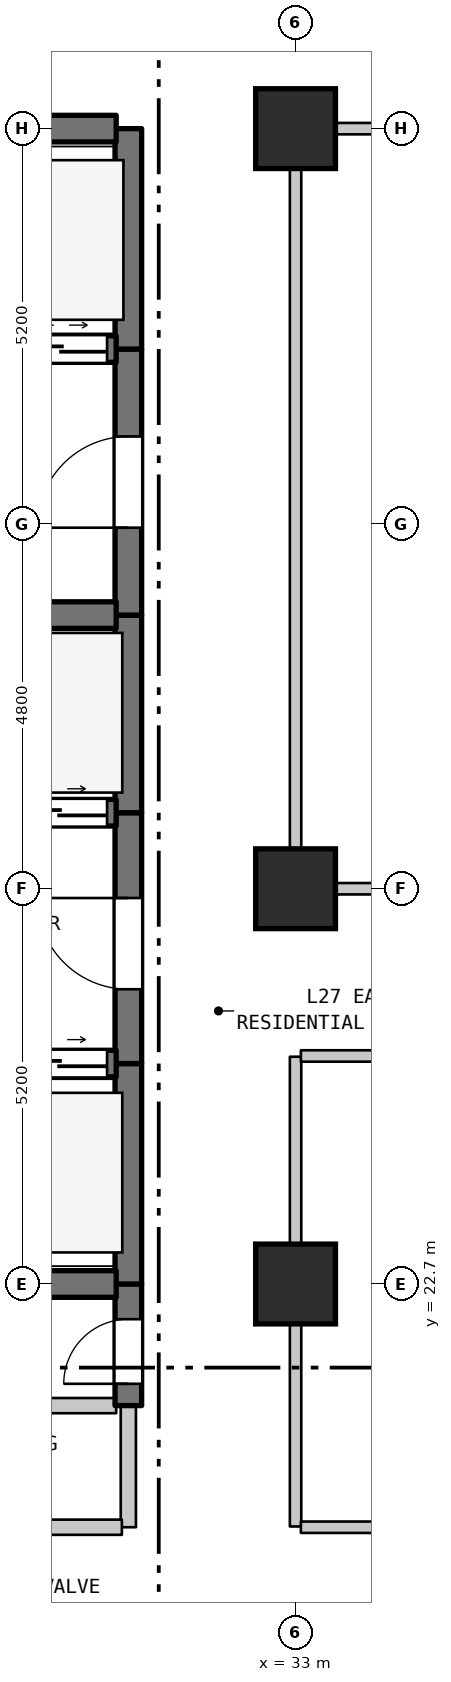
"""IFC4 building model, lengths in metres.
Left out: names, types, materials, properties, quantities, classifications, styles, units other than length and angle.
Written with IfcOpenShell. Run it as: python <this file> out.ifc"""

import sys

from ifc_helpers import new_model, si_unit, direction, frame, frame_2d, origin, origin_2d, place, context, subcontext, project, spatial, rectangle, extrude, element, fill, save


model = new_model("IFC4")
c1 = context("Model", 3, precision=1e-05, world=origin(), true_north=direction((0.0, 1.0)))
c2 = subcontext(c1, "Body", "Model", "MODEL_VIEW")
j1 = project(units=[si_unit("LENGTHUNIT", "METRE"), si_unit("PLANEANGLEUNIT", "RADIAN")], contexts=[c1])
p1 = place(None, origin())
s1 = spatial("IfcSite", under=j1, at=p1, CompositionType="ELEMENT")
p2 = place(p1, origin())
s2 = spatial("IfcBuilding", under=s1, at=p2, CompositionType="ELEMENT")
p3 = place(p2, frame((0.0, 0.0, 113.1)))
s3 = spatial("IfcBuildingStorey", under=s2, at=p3, CompositionType="ELEMENT", Elevation=113.1)
for number, where, z_axis, x_axis in (
    (1, (33.0, 22.7, 0.0), (0.0, 0.0, 1.0), (1.0, 0.0, 0.0)),
    (2, (33.0, 27.9, 0.0), (0.0, 0.0, 1.0), (1.0, 0.0, 0.0)),
    (3, (33.0, 37.9, 0.0), (0.0, 0.0, 1.0), (1.0, 0.0, 0.0)),
):
    element("IfcColumn", number, at=place(p3, frame(where, z_axis=z_axis, x_axis=x_axis)), inside=s3, PredefinedType="COLUMN", context=c2, shape_type="SweptSolid", body=[
        extrude(rectangle(XDim=1.05, YDim=1.05, at=origin_2d()), origin(), (0.0, 0.0, 1.0), 3.7),
    ])
p4 = place(p3, frame((30.8, 19.5, 0.0), z_axis=(0.0, 0.0, 1.0), x_axis=(0.0, 1.0, 0.0)))
e4 = element("IfcWall", 4, at=p4, inside=s3, PredefinedType="STANDARD", context=c2, shape_type="SweptSolid", body=[
    extrude(rectangle(XDim=1.6, YDim=0.2, at=frame_2d((0.8, 0.0))), origin(), (0.0, 0.0, 1.0), 3.385),
])
p5 = place(p3, frame((30.8, 21.1, 0.0), z_axis=(0.0, 0.0, 1.0), x_axis=(0.0, 1.0, 0.0)))
e5 = element("IfcWall", 5, at=p5, inside=s3, PredefinedType="SHEAR", context=c2, shape_type="SweptSolid", body=[
    extrude(rectangle(XDim=1.6, YDim=0.35, at=frame_2d((0.8, 0.0))), origin(), (0.0, 0.0, 1.0), 3.385),
])
p6 = place(p5, frame((0.287, 0.0, 0.0)))
e6 = element("IfcOpeningElement", 6, at=p6, cuts=e5, PredefinedType="OPENING", context=c2, shape_type="SweptSolid", body=[
    extrude(rectangle(XDim=0.85, YDim=2.1, at=frame_2d((0.425, 1.05))), frame((0.0, 0.185, 0.0), z_axis=(0.0, -1.0, 0.0), x_axis=(1.0, 0.0, 0.0)), (0.0, 0.0, 1.0), 0.37),
])
p7 = place(p3, frame((30.8, 22.7, 0.0), z_axis=(0.0, 0.0, 1.0), x_axis=(0.0, 1.0, 0.0)))
e7 = element("IfcWall", 7, at=p7, inside=s3, PredefinedType="SHEAR", context=c2, shape_type="SweptSolid", body=[
    extrude(rectangle(XDim=2.9, YDim=0.35, at=frame_2d((1.45, 0.0))), origin(), (0.0, 0.0, 1.0), 3.385),
])
p8 = place(p3, frame((30.8, 25.6, 0.0), z_axis=(0.0, 0.0, 1.0), x_axis=(0.0, 1.0, 0.0)))
e8 = element("IfcWall", 8, at=p8, inside=s3, PredefinedType="SHEAR", context=c2, shape_type="SweptSolid", body=[
    extrude(rectangle(XDim=3.3, YDim=0.35, at=frame_2d((1.65, 0.0))), origin(), (0.0, 0.0, 1.0), 3.385),
])
p9 = place(p8, frame((0.978, 0.0, 0.0)))
e9 = element("IfcOpeningElement", 9, at=p9, cuts=e8, PredefinedType="OPENING", context=c2, shape_type="SweptSolid", body=[
    extrude(rectangle(XDim=1.2, YDim=2.2, at=frame_2d((0.6, 1.1))), frame((0.0, 0.185, 0.0), z_axis=(0.0, -1.0, 0.0), x_axis=(1.0, 0.0, 0.0)), (0.0, 0.0, 1.0), 0.37),
])
p10 = place(p3, frame((30.8, 28.9, 0.0), z_axis=(0.0, 0.0, 1.0), x_axis=(0.0, 1.0, 0.0)))
e10 = element("IfcWall", 10, at=p10, inside=s3, PredefinedType="SHEAR", context=c2, shape_type="SweptSolid", body=[
    extrude(rectangle(XDim=2.6, YDim=0.35, at=frame_2d((1.3, 0.0))), origin(), (0.0, 0.0, 1.0), 3.385),
])
p11 = place(p3, frame((30.8, 31.5, 0.0), z_axis=(0.0, 0.0, 1.0), x_axis=(0.0, 1.0, 0.0)))
e11 = element("IfcWall", 11, at=p11, inside=s3, PredefinedType="SHEAR", context=c2, shape_type="SweptSolid", body=[
    extrude(rectangle(XDim=3.5, YDim=0.35, at=frame_2d((1.75, 0.0))), origin(), (0.0, 0.0, 1.0), 3.385),
])
p12 = place(p11, frame((1.15, 0.0, 0.0)))
e12 = element("IfcOpeningElement", 12, at=p12, cuts=e11, PredefinedType="OPENING", context=c2, shape_type="SweptSolid", body=[
    extrude(rectangle(XDim=1.2, YDim=2.2, at=frame_2d((0.6, 1.1))), frame((0.0, 0.185, 0.0), z_axis=(0.0, -1.0, 0.0), x_axis=(1.0, 0.0, 0.0)), (0.0, 0.0, 1.0), 0.37),
])
p13 = place(p3, frame((30.8, 35.0, 0.0), z_axis=(0.0, 0.0, 1.0), x_axis=(0.0, 1.0, 0.0)))
e13 = element("IfcWall", 13, at=p13, inside=s3, PredefinedType="SHEAR", context=c2, shape_type="SweptSolid", body=[
    extrude(rectangle(XDim=2.9, YDim=0.35, at=frame_2d((1.45, 0.0))), origin(), (0.0, 0.0, 1.0), 3.385),
])
p14 = place(p3, frame((33.0, 19.51, 0.0), z_axis=(0.0, 0.0, 1.0), x_axis=(0.0, 1.0, 0.0)))
e14 = element("IfcWall", 14, at=p14, inside=s3, PredefinedType="STANDARD", context=c2, shape_type="SweptSolid", body=[
    extrude(rectangle(XDim=6.18, YDim=0.15, at=frame_2d((3.09, 0.0))), origin(), (0.0, 0.0, 1.0), 2.935),
])
p15 = place(p3, frame((33.0, 27.91, 0.0), z_axis=(0.0, 0.0, 1.0), x_axis=(0.0, 1.0, 0.0)))
e15 = element("IfcWall", 15, at=p15, inside=s3, PredefinedType="STANDARD", context=c2, shape_type="SweptSolid", body=[
    extrude(rectangle(XDim=9.98, YDim=0.15, at=frame_2d((4.99, 0.0))), origin(), (0.0, 0.0, 1.0), 2.885),
])
p16 = place(p3, frame((27.285, 19.5, 0.0), z_axis=(0.0, 0.0, 1.0), x_axis=(1.0, 0.0, 0.0)))
e16 = element("IfcWall", 16, at=p16, inside=s3, PredefinedType="STANDARD", context=c2, shape_type="SweptSolid", body=[
    extrude(rectangle(XDim=3.43, YDim=0.2, at=frame_2d((1.715, 0.0))), origin(), (0.0, 0.0, 1.0), 3.385),
])
p17 = place(p16, frame((1.192, 0.0, 0.0)))
e17 = element("IfcOpeningElement", 17, at=p17, cuts=e16, PredefinedType="OPENING", context=c2, shape_type="SweptSolid", body=[
    extrude(rectangle(XDim=0.9, YDim=2.15, at=frame_2d((0.45, 1.075))), frame((0.0, 0.11, 0.0), z_axis=(0.0, -1.0, 0.0), x_axis=(1.0, 0.0, 0.0)), (0.0, 0.0, 1.0), 0.22),
])
p18 = place(p3, frame((33.07, 19.5, 0.0), z_axis=(0.0, 0.0, 1.0), x_axis=(1.0, 0.0, 0.0)))
e18 = element("IfcWall", 18, at=p18, inside=s3, PredefinedType="STANDARD", context=c2, shape_type="SweptSolid", body=[
    extrude(rectangle(XDim=21.51, YDim=0.15, at=frame_2d((10.755, 0.0))), origin(), (0.0, 0.0, 1.0), 3.385),
])
p19 = place(p3, frame((27.285, 21.1, 0.0), z_axis=(0.0, 0.0, 1.0), x_axis=(1.0, 0.0, 0.0)))
e19 = element("IfcWall", 19, at=p19, inside=s3, PredefinedType="STANDARD", context=c2, shape_type="SweptSolid", body=[
    extrude(rectangle(XDim=3.355, YDim=0.2, at=frame_2d((1.677, 0.0))), origin(), (0.0, 0.0, 1.0), 3.385),
])
p20 = place(p3, frame((27.46, 22.7, 0.0), z_axis=(0.0, 0.0, 1.0), x_axis=(1.0, 0.0, 0.0)))
e20 = element("IfcWall", 20, at=p20, inside=s3, PredefinedType="SHEAR", context=c2, shape_type="SweptSolid", body=[
    extrude(rectangle(XDim=3.18, YDim=0.35, at=frame_2d((1.59, 0.0))), origin(), (0.0, 0.0, 1.0), 3.385),
])
p21 = place(p3, frame((27.46, 25.6, 0.0), z_axis=(0.0, 0.0, 1.0), x_axis=(1.0, 0.0, 0.0)))
e21 = element("IfcWall", 21, at=p21, inside=s3, PredefinedType="SHEAR", context=c2, shape_type="SweptSolid", body=[
    extrude(rectangle(XDim=3.18, YDim=0.35, at=frame_2d((1.59, 0.0))), origin(), (0.0, 0.0, 1.0), 3.385),
])
p22 = place(p21, frame((0.12, 0.0, 0.0)))
e22 = element("IfcOpeningElement", 22, at=p22, cuts=e21, PredefinedType="OPENING", context=c2, shape_type="SweptSolid", body=[
    extrude(rectangle(XDim=1.25, YDim=2.2, at=frame_2d((0.625, 1.1))), frame((0.0, 0.185, 0.0), z_axis=(0.0, -1.0, 0.0), x_axis=(1.0, 0.0, 0.0)), (0.0, 0.0, 1.0), 0.37),
])
p23 = place(p21, frame((1.81, 0.0, 0.0)))
e23 = element("IfcOpeningElement", 23, at=p23, cuts=e21, PredefinedType="OPENING", context=c2, shape_type="SweptSolid", body=[
    extrude(rectangle(XDim=1.25, YDim=2.2, at=frame_2d((0.625, 1.1))), frame((0.0, 0.185, 0.0), z_axis=(0.0, -1.0, 0.0), x_axis=(1.0, 0.0, 0.0)), (0.0, 0.0, 1.0), 0.37),
])
p24 = place(p3, frame((33.07, 25.7, 0.0), z_axis=(0.0, 0.0, 1.0), x_axis=(1.0, 0.0, 0.0)))
e24 = element("IfcWall", 24, at=p24, inside=s3, PredefinedType="STANDARD", context=c2, shape_type="SweptSolid", body=[
    extrude(rectangle(XDim=21.51, YDim=0.15, at=frame_2d((10.755, 0.0))), origin(), (0.0, 0.0, 1.0), 3.385),
])
p25 = place(p3, frame((33.07, 27.9, 0.0), z_axis=(0.0, 0.0, 1.0), x_axis=(1.0, 0.0, 0.0)))
e25 = element("IfcWall", 25, at=p25, inside=s3, PredefinedType="STANDARD", context=c2, shape_type="SweptSolid", body=[
    extrude(rectangle(XDim=11.93, YDim=0.15, at=frame_2d((5.965, 0.0))), origin(), (0.0, 0.0, 1.0), 2.885),
])
p26 = place(p25, frame((10.185, 0.0, 0.0)))
e26 = element("IfcOpeningElement", 26, at=p26, cuts=e25, PredefinedType="OPENING", context=c2, shape_type="SweptSolid", body=[
    extrude(rectangle(XDim=1.0, YDim=2.15, at=frame_2d((0.5, 1.075))), frame((0.0, 0.085, 0.0), z_axis=(0.0, -1.0, 0.0), x_axis=(1.0, 0.0, 0.0)), (0.0, 0.0, 1.0), 0.17),
])
p27 = place(p3, frame((27.46, 28.9, 0.0), z_axis=(0.0, 0.0, 1.0), x_axis=(1.0, 0.0, 0.0)))
e27 = element("IfcWall", 27, at=p27, inside=s3, PredefinedType="SHEAR", context=c2, shape_type="SweptSolid", body=[
    extrude(rectangle(XDim=3.18, YDim=0.35, at=frame_2d((1.59, 0.0))), origin(), (0.0, 0.0, 1.0), 3.385),
])
p28 = place(p27, frame((0.12, 0.0, 0.0)))
e28 = element("IfcOpeningElement", 28, at=p28, cuts=e27, PredefinedType="OPENING", context=c2, shape_type="SweptSolid", body=[
    extrude(rectangle(XDim=1.25, YDim=2.2, at=frame_2d((0.625, 1.1))), frame((0.0, 0.185, 0.0), z_axis=(0.0, -1.0, 0.0), x_axis=(1.0, 0.0, 0.0)), (0.0, 0.0, 1.0), 0.37),
])
p29 = place(p27, frame((1.81, 0.0, 0.0)))
e29 = element("IfcOpeningElement", 29, at=p29, cuts=e27, PredefinedType="OPENING", context=c2, shape_type="SweptSolid", body=[
    extrude(rectangle(XDim=1.25, YDim=2.2, at=frame_2d((0.625, 1.1))), frame((0.0, 0.185, 0.0), z_axis=(0.0, -1.0, 0.0), x_axis=(1.0, 0.0, 0.0)), (0.0, 0.0, 1.0), 0.37),
])
p30 = place(p3, frame((27.46, 31.5, 0.0), z_axis=(0.0, 0.0, 1.0), x_axis=(1.0, 0.0, 0.0)))
e30 = element("IfcWall", 30, at=p30, inside=s3, PredefinedType="SHEAR", context=c2, shape_type="SweptSolid", body=[
    extrude(rectangle(XDim=3.18, YDim=0.35, at=frame_2d((1.59, 0.0))), origin(), (0.0, 0.0, 1.0), 3.385),
])
p31 = place(p3, frame((19.16, 35.0, 0.0), z_axis=(0.0, 0.0, 1.0), x_axis=(1.0, 0.0, 0.0)))
e31 = element("IfcWall", 31, at=p31, inside=s3, PredefinedType="SHEAR", context=c2, shape_type="SweptSolid", body=[
    extrude(rectangle(XDim=11.48, YDim=0.35, at=frame_2d((5.74, 0.0))), origin(), (0.0, 0.0, 1.0), 3.385),
])
p32 = place(p31, frame((0.365, 0.0, 0.0)))
e32 = element("IfcOpeningElement", 32, at=p32, cuts=e31, PredefinedType="OPENING", context=c2, shape_type="SweptSolid", body=[
    extrude(rectangle(XDim=1.35, YDim=2.2, at=frame_2d((0.675, 1.1))), frame((0.0, 0.185, 0.0), z_axis=(0.0, -1.0, 0.0), x_axis=(1.0, 0.0, 0.0)), (0.0, 0.0, 1.0), 0.37),
])
p33 = place(p31, frame((2.765, 0.0, 0.0)))
e33 = element("IfcOpeningElement", 33, at=p33, cuts=e31, PredefinedType="OPENING", context=c2, shape_type="SweptSolid", body=[
    extrude(rectangle(XDim=1.35, YDim=2.2, at=frame_2d((0.675, 1.1))), frame((0.0, 0.185, 0.0), z_axis=(0.0, -1.0, 0.0), x_axis=(1.0, 0.0, 0.0)), (0.0, 0.0, 1.0), 0.37),
])
p34 = place(p31, frame((4.915, 0.0, 0.0)))
e34 = element("IfcOpeningElement", 34, at=p34, cuts=e31, PredefinedType="OPENING", context=c2, shape_type="SweptSolid", body=[
    extrude(rectangle(XDim=1.2, YDim=2.2, at=frame_2d((0.6, 1.1))), frame((0.0, 0.185, 0.0), z_axis=(0.0, -1.0, 0.0), x_axis=(1.0, 0.0, 0.0)), (0.0, 0.0, 1.0), 0.37),
])
p35 = place(p31, frame((6.665, 0.0, 0.0)))
e35 = element("IfcOpeningElement", 35, at=p35, cuts=e31, PredefinedType="OPENING", context=c2, shape_type="SweptSolid", body=[
    extrude(rectangle(XDim=1.2, YDim=2.2, at=frame_2d((0.6, 1.1))), frame((0.0, 0.185, 0.0), z_axis=(0.0, -1.0, 0.0), x_axis=(1.0, 0.0, 0.0)), (0.0, 0.0, 1.0), 0.37),
])
p36 = place(p31, frame((8.415, 0.0, 0.0)))
e36 = element("IfcOpeningElement", 36, at=p36, cuts=e31, PredefinedType="OPENING", context=c2, shape_type="SweptSolid", body=[
    extrude(rectangle(XDim=1.2, YDim=2.2, at=frame_2d((0.6, 1.1))), frame((0.0, 0.185, 0.0), z_axis=(0.0, -1.0, 0.0), x_axis=(1.0, 0.0, 0.0)), (0.0, 0.0, 1.0), 0.37),
])
p37 = place(p31, frame((10.16, 0.0, 0.0)))
e37 = element("IfcOpeningElement", 37, at=p37, cuts=e31, PredefinedType="OPENING", context=c2, shape_type="SweptSolid", body=[
    extrude(rectangle(XDim=1.2, YDim=2.2, at=frame_2d((0.6, 1.1))), frame((0.0, 0.185, 0.0), z_axis=(0.0, -1.0, 0.0), x_axis=(1.0, 0.0, 0.0)), (0.0, 0.0, 1.0), 0.37),
])
p38 = place(p3, frame((19.16, 37.9, 0.0), z_axis=(0.0, 0.0, 1.0), x_axis=(1.0, 0.0, 0.0)))
e38 = element("IfcWall", 38, at=p38, inside=s3, PredefinedType="SHEAR", context=c2, shape_type="SweptSolid", body=[
    extrude(rectangle(XDim=11.48, YDim=0.35, at=frame_2d((5.74, 0.0))), origin(), (0.0, 0.0, 1.0), 3.385),
])
p39 = place(p3, frame((33.07, 37.9, 0.0), z_axis=(0.0, 0.0, 1.0), x_axis=(1.0, 0.0, 0.0)))
e39 = element("IfcWall", 39, at=p39, inside=s3, PredefinedType="STANDARD", context=c2, shape_type="SweptSolid", body=[
    extrude(rectangle(XDim=26.935, YDim=0.15, at=frame_2d((13.467, 0.0))), origin(), (0.0, 0.0, 1.0), 3.385),
])
p40 = place(p39, frame((12.96, 0.0, 0.0)))
e40 = element("IfcOpeningElement", 40, at=p40, cuts=e39, PredefinedType="OPENING", context=c2, shape_type="SweptSolid", body=[
    extrude(rectangle(XDim=1.0, YDim=2.15, at=frame_2d((0.5, 1.075))), frame((0.0, 0.085, 0.0), z_axis=(0.0, -1.0, 0.0), x_axis=(1.0, 0.0, 0.0)), (0.0, 0.0, 1.0), 0.17),
])
p41 = place(p6, origin())
e41 = element("IfcDoor", 41, at=p41, inside=s3, OperationType="SINGLE_SWING_LEFT", PredefinedType="DOOR", context=c2, shape_type="SweptSolid", body=[
    extrude(rectangle(XDim=0.85, YDim=2.1, at=frame_2d((0.425, 1.05))), frame((0.0, 0.025, 0.0), z_axis=(0.0, -1.0, 0.0), x_axis=(1.0, 0.0, 0.0)), (0.0, 0.0, 1.0), 0.05),
])
fill(e6, e41)
p42 = place(p9, origin())
e42 = element("IfcDoor", 42, at=p42, inside=s3, OperationType="SINGLE_SWING_RIGHT", PredefinedType="DOOR", context=c2, shape_type="SweptSolid", body=[
    extrude(rectangle(XDim=1.2, YDim=2.2, at=frame_2d((0.6, 1.1))), frame((0.0, 0.025, 0.0), z_axis=(0.0, -1.0, 0.0), x_axis=(1.0, 0.0, 0.0)), (0.0, 0.0, 1.0), 0.05),
])
fill(e9, e42)
p43 = place(p12, origin())
e43 = element("IfcDoor", 43, at=p43, inside=s3, OperationType="SINGLE_SWING_LEFT", PredefinedType="DOOR", context=c2, shape_type="SweptSolid", body=[
    extrude(rectangle(XDim=1.2, YDim=2.2, at=frame_2d((0.6, 1.1))), frame((0.0, 0.025, 0.0), z_axis=(0.0, -1.0, 0.0), x_axis=(1.0, 0.0, 0.0)), (0.0, 0.0, 1.0), 0.05),
])
fill(e12, e43)
p44 = place(p23, origin())
e44 = element("IfcDoor", 44, at=p44, inside=s3, OperationType="DOUBLE_DOOR_SLIDING", PredefinedType="DOOR", context=c2, shape_type="SweptSolid", body=[
    extrude(rectangle(XDim=1.25, YDim=2.2, at=frame_2d((0.625, 1.1))), frame((0.0, 0.025, 0.0), z_axis=(0.0, -1.0, 0.0), x_axis=(1.0, 0.0, 0.0)), (0.0, 0.0, 1.0), 0.05),
])
fill(e23, e44)
p45 = place(p29, origin())
e45 = element("IfcDoor", 45, at=p45, inside=s3, OperationType="DOUBLE_DOOR_SLIDING", PredefinedType="DOOR", context=c2, shape_type="SweptSolid", body=[
    extrude(rectangle(XDim=1.25, YDim=2.2, at=frame_2d((0.625, 1.1))), frame((0.0, 0.025, 0.0), z_axis=(0.0, -1.0, 0.0), x_axis=(1.0, 0.0, 0.0)), (0.0, 0.0, 1.0), 0.05),
])
fill(e29, e45)
p46 = place(p37, origin())
e46 = element("IfcDoor", 46, at=p46, inside=s3, OperationType="DOUBLE_DOOR_SLIDING", PredefinedType="DOOR", context=c2, shape_type="SweptSolid", body=[
    extrude(rectangle(XDim=1.2, YDim=2.2, at=frame_2d((0.6, 1.1))), frame((0.0, 0.025, 0.0), z_axis=(0.0, -1.0, 0.0), x_axis=(1.0, 0.0, 0.0)), (0.0, 0.0, 1.0), 0.05),
])
fill(e37, e46)
save(model, sys.argv[1])
